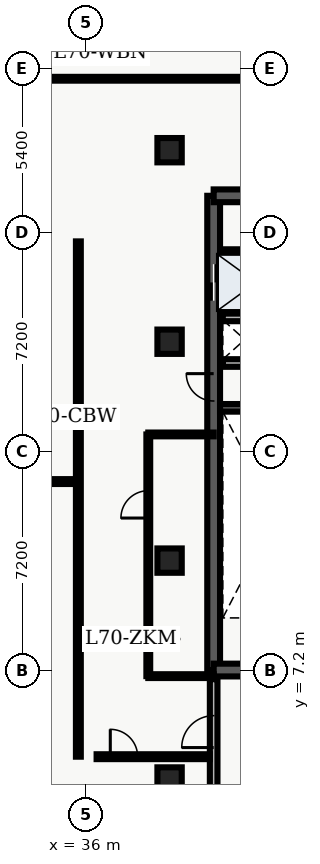
"""IFC4 building model, lengths in metres.
Left out: names, types, materials, properties, quantities, classifications, styles, units other than length and angle.
Written with IfcOpenShell. Run it as: python <this file> out.ifc"""

import sys

from ifc_helpers import new_model, entity, si_unit, converted_unit, direction, frame, origin_with_axes, origin_2d_with_axis, place, context, subcontext, project, spatial, polyline, rectangle, outline, extrude, element, fill, save


model = new_model("IFC4")
c1 = context("Model", 3, precision=1e-05, world=origin_with_axes(), true_north=direction((0.0, 1.0)))
c2 = subcontext(c1, "Body", "Model", "MODEL_VIEW")
j1 = project(units=[si_unit("LENGTHUNIT", "METRE"), converted_unit("PLANEANGLEUNIT", "DEGREE", entity("IfcPlaneAngleMeasure", 0.017), si_unit("PLANEANGLEUNIT", "RADIAN"), dimensions=[0, 0, 0, 0, 0, 0, 0])], contexts=[c1])
p1 = place(None, origin_with_axes())
s1 = spatial("IfcSite", under=j1, at=p1, CompositionType="ELEMENT")
p2 = place(p1, origin_with_axes())
s2 = spatial("IfcBuilding", under=s1, at=p2, CompositionType="ELEMENT")
p3 = place(p2, frame((0.0, 0.0, 284.1), z_axis=(0.0, 0.0, 1.0), x_axis=(1.0, 0.0, 0.0)))
s3 = spatial("IfcBuildingStorey", under=s2, at=p3, CompositionType="ELEMENT", Elevation=284.1)
p4 = place(p3, frame((40.2, 7.2, 0.0), z_axis=(0.0, 0.0, 1.0), x_axis=(0.0, 1.0, 0.0)))
e1 = element("IfcWall", 1, at=p4, inside=s3, PredefinedType="SHEAR", context=c2, shape_type="SweptSolid", body=[
    extrude(outline(polyline([(0.0, -0.21), (15.6, -0.21), (15.6, 0.21), (0.0, 0.21), (0.0, -0.21)])), origin_with_axes(), (0.0, 0.0, 1.0), 3.6),
])
p5 = place(p4, frame((12.75, 0.0, 0.0), z_axis=(0.0, 0.0, 1.0), x_axis=(1.0, 0.0, 0.0)))
e2 = element("IfcOpeningElement", 2, at=p5, cuts=e1, PredefinedType="OPENING", context=c2, shape_type="SweptSolid", body=[
    extrude(rectangle(XDim=1.2, YDim=0.44, at=origin_2d_with_axis()), origin_with_axes(), (0.0, 0.0, 1.0), 2.15),
])
p6 = place(p4, frame((9.3, 0.0, 0.0), z_axis=(0.0, 0.0, 1.0), x_axis=(1.0, 0.0, 0.0)))
e3 = element("IfcOpeningElement", 3, at=p6, cuts=e1, PredefinedType="OPENING", context=c2, shape_type="SweptSolid", body=[
    extrude(rectangle(XDim=0.9, YDim=0.44, at=origin_2d_with_axis()), origin_with_axes(), (0.0, 0.0, 1.0), 2.15),
])
p7 = place(p3, frame((40.2, 7.2, 0.0), z_axis=(0.0, 0.0, 1.0), x_axis=(1.0, 0.0, 0.0)))
e4 = element("IfcWall", 4, at=p7, inside=s3, PredefinedType="SHEAR", context=c2, shape_type="SweptSolid", body=[
    extrude(outline(polyline([(0.0, -0.21), (7.85, -0.21), (7.85, 0.21), (0.0, 0.21), (0.0, -0.21)])), origin_with_axes(), (0.0, 0.0, 1.0), 3.6),
])
p8 = place(p7, frame((2.175, 0.0, 0.0), z_axis=(0.0, 0.0, 1.0), x_axis=(1.0, 0.0, 0.0)))
e5 = element("IfcOpeningElement", 5, at=p8, cuts=e4, PredefinedType="OPENING", context=c2, shape_type="SweptSolid", body=[
    extrude(rectangle(XDim=1.05, YDim=0.44, at=origin_2d_with_axis()), origin_with_axes(), (0.0, 0.0, 1.0), 2.15),
])
p9 = place(p3, frame((40.2, 22.8, 0.0), z_axis=(0.0, 0.0, 1.0), x_axis=(1.0, 0.0, 0.0)))
e6 = element("IfcWall", 6, at=p9, inside=s3, PredefinedType="SHEAR", context=c2, shape_type="SweptSolid", body=[
    extrude(outline(polyline([(0.0, -0.21), (7.85, -0.21), (7.85, 0.21), (0.0, 0.21), (0.0, -0.21)])), origin_with_axes(), (0.0, 0.0, 1.0), 3.6),
])
p10 = place(p9, frame((5.775, 0.0, 0.0), z_axis=(0.0, 0.0, 1.0), x_axis=(1.0, 0.0, 0.0)))
e7 = element("IfcOpeningElement", 7, at=p10, cuts=e6, PredefinedType="OPENING", context=c2, shape_type="SweptSolid", body=[
    extrude(rectangle(XDim=1.05, YDim=0.44, at=origin_2d_with_axis()), origin_with_axes(), (0.0, 0.0, 1.0), 2.15),
])
p11 = place(p9, frame((2.15, 0.0, 0.0), z_axis=(0.0, 0.0, 1.0), x_axis=(1.0, 0.0, 0.0)))
e8 = element("IfcOpeningElement", 8, at=p11, cuts=e6, PredefinedType="OPENING", context=c2, shape_type="SweptSolid", body=[
    extrude(rectangle(XDim=0.9, YDim=0.44, at=origin_2d_with_axis()), origin_with_axes(), (0.0, 0.0, 1.0), 2.15),
])
p12 = place(p3, frame((40.41, 15.825, 0.0), z_axis=(0.0, 0.0, 1.0), x_axis=(1.0, 0.0, 0.0)))
e9 = element("IfcWall", 9, at=p12, inside=s3, PredefinedType="SHEAR", context=c2, shape_type="SweptSolid", body=[
    extrude(outline(polyline([(0.0, -0.125), (3.59, -0.125), (3.59, 0.125), (0.0, 0.125), (0.0, -0.125)])), origin_with_axes(), (0.0, 0.0, 1.0), 3.6),
])
p13 = place(p3, frame((40.5, 17.3, 0.0), z_axis=(0.0, 0.0, 1.0), x_axis=(1.0, 0.0, 0.0)))
e10 = element("IfcWall", 10, at=p13, inside=s3, PredefinedType="SOLIDWALL", context=c2, shape_type="SweptSolid", body=[
    extrude(outline(polyline([(0.0, -0.125), (3.5, -0.125), (3.5, 0.125), (0.0, 0.125), (0.0, -0.125)])), origin_with_axes(), (0.0, 0.0, 1.0), 2.64),
])
p14 = place(p13, frame((2.4, 0.0, 0.0), z_axis=(0.0, 0.0, 1.0), x_axis=(1.0, 0.0, 0.0)))
e11 = element("IfcOpeningElement", 11, at=p14, cuts=e10, PredefinedType="OPENING", context=c2, shape_type="SweptSolid", body=[
    extrude(rectangle(XDim=0.9, YDim=0.27, at=origin_2d_with_axis()), origin_with_axes(), (0.0, 0.0, 1.0), 2.15),
])
p15 = place(p3, frame((40.5, 18.8, 0.0), z_axis=(0.0, 0.0, 1.0), x_axis=(1.0, 0.0, 0.0)))
e12 = element("IfcWall", 12, at=p15, inside=s3, PredefinedType="SOLIDWALL", context=c2, shape_type="SweptSolid", body=[
    extrude(outline(polyline([(0.0, -0.125), (3.5, -0.125), (3.5, 0.125), (0.0, 0.125), (0.0, -0.125)])), origin_with_axes(), (0.0, 0.0, 1.0), 2.64),
])
p16 = place(p3, frame((40.2, 3.1, 0.0), z_axis=(0.0, 0.0, 1.0), x_axis=(0.0, 1.0, 0.0)))
e13 = element("IfcWall", 13, at=p16, inside=s3, PredefinedType="SOLIDWALL", context=c2, shape_type="SweptSolid", body=[
    extrude(outline(polyline([(0.0, -0.125), (3.8, -0.125), (3.8, 0.125), (0.0, 0.125), (0.0, -0.125)])), origin_with_axes(), (0.0, 0.0, 1.0), 2.64),
])
p17 = place(p16, frame((2.075, 0.0, 0.0), z_axis=(0.0, 0.0, 1.0), x_axis=(1.0, 0.0, 0.0)))
e14 = element("IfcOpeningElement", 14, at=p17, cuts=e13, PredefinedType="OPENING", context=c2, shape_type="SweptSolid", body=[
    extrude(rectangle(XDim=1.05, YDim=0.27, at=origin_2d_with_axis()), origin_with_axes(), (0.0, 0.0, 1.0), 2.15),
])
for number, where, z_axis, x_axis in (
    (15, (38.75, 3.6, 0.0), (0.0, 0.0, 1.0), (1.0, 0.0, 0.0)),
    (16, (38.75, 10.8, 0.0), (0.0, 0.0, 1.0), (1.0, 0.0, 0.0)),
    (17, (38.75, 18.0, 0.0), (0.0, 0.0, 1.0), (1.0, 0.0, 0.0)),
    (18, (38.75, 24.3, 0.0), (0.0, 0.0, 1.0), (1.0, 0.0, 0.0)),
):
    element("IfcColumn", number, at=place(p3, frame(where, z_axis=z_axis, x_axis=x_axis)), inside=s3, PredefinedType="COLUMN", context=c2, shape_type="SweptSolid", body=[
        extrude(rectangle(XDim=0.8, YDim=0.8, at=origin_2d_with_axis()), origin_with_axes(), (0.0, 0.0, 1.0), 3.9),
    ])
p18 = place(p3, frame((40.5, 20.96, 0.0), z_axis=(0.0, 0.0, 1.0), x_axis=(1.0, 0.0, 0.0)))
e19 = element("IfcWall", 19, at=p18, inside=s3, PredefinedType="PARTITIONING", context=c2, shape_type="SweptSolid", body=[
    extrude(outline(polyline([(0.0, -0.08), (3.5, -0.08), (3.5, 0.08), (0.0, 0.08), (0.0, -0.08)])), origin_with_axes(), (0.0, 0.0, 1.0), 2.64),
])
p19 = place(p3, frame((20.3, 13.4, 0.0), z_axis=(0.0, 0.0, 1.0), x_axis=(1.0, 0.0, 0.0)))
e20 = element("IfcWall", 20, at=p19, inside=s3, PredefinedType="PARTITIONING", context=c2, shape_type="SweptSolid", body=[
    extrude(outline(polyline([(0.0, -0.08), (15.45, -0.08), (15.45, 0.08), (0.0, 0.08), (0.0, -0.08)])), origin_with_axes(), (0.0, 0.0, 1.0), 2.64),
])
p20 = place(p19, frame((2.304, 0.0, 0.0), z_axis=(0.0, 0.0, 1.0), x_axis=(1.0, 0.0, 0.0)))
e21 = element("IfcOpeningElement", 21, at=p20, cuts=e20, PredefinedType="OPENING", context=c2, shape_type="SweptSolid", body=[
    extrude(rectangle(XDim=1.0, YDim=0.18, at=origin_2d_with_axis()), origin_with_axes(), (0.0, 0.0, 1.0), 2.15),
])
p21 = place(p19, frame((6.866, 0.0, 0.0), z_axis=(0.0, 0.0, 1.0), x_axis=(1.0, 0.0, 0.0)))
e22 = element("IfcOpeningElement", 22, at=p21, cuts=e20, PredefinedType="OPENING", context=c2, shape_type="SweptSolid", body=[
    extrude(rectangle(XDim=1.0, YDim=0.18, at=origin_2d_with_axis()), origin_with_axes(), (0.0, 0.0, 1.0), 2.15),
])
p22 = place(p19, frame((12.337, 0.0, 0.0), z_axis=(0.0, 0.0, 1.0), x_axis=(1.0, 0.0, 0.0)))
e23 = element("IfcOpeningElement", 23, at=p22, cuts=e20, PredefinedType="OPENING", context=c2, shape_type="SweptSolid", body=[
    extrude(rectangle(XDim=1.2, YDim=0.18, at=origin_2d_with_axis()), origin_with_axes(), (0.0, 0.0, 1.0), 2.2),
])
p23 = place(p3, frame((20.3, 15.7, 0.0), z_axis=(0.0, 0.0, 1.0), x_axis=(1.0, 0.0, 0.0)))
e24 = element("IfcWall", 24, at=p23, inside=s3, PredefinedType="PARTITIONING", context=c2, shape_type="SweptSolid", body=[
    extrude(outline(polyline([(0.0, -0.08), (15.45, -0.08), (15.45, 0.08), (0.0, 0.08), (0.0, -0.08)])), origin_with_axes(), (0.0, 0.0, 1.0), 2.64),
])
p24 = place(p23, frame((7.775, 0.0, 0.0), z_axis=(0.0, 0.0, 1.0), x_axis=(1.0, 0.0, 0.0)))
e25 = element("IfcOpeningElement", 25, at=p24, cuts=e24, PredefinedType="OPENING", context=c2, shape_type="SweptSolid", body=[
    extrude(rectangle(XDim=1.0, YDim=0.18, at=origin_2d_with_axis()), origin_with_axes(), (0.0, 0.0, 1.0), 2.15),
])
p25 = place(p3, frame((35.75, 4.35, 0.0), z_axis=(0.0, 0.0, 1.0), x_axis=(0.0, 1.0, 0.0)))
e26 = element("IfcWall", 26, at=p25, inside=s3, PredefinedType="PARTITIONING", context=c2, shape_type="SweptSolid", body=[
    extrude(outline(polyline([(0.0, -0.08), (16.95, -0.08), (16.95, 0.08), (0.0, 0.08), (0.0, -0.08)])), origin_with_axes(), (0.0, 0.0, 1.0), 2.64),
])
p26 = place(p3, frame((34.535, 26.65, 0.0), z_axis=(0.0, 0.0, 1.0), x_axis=(1.0, 0.0, 0.0)))
e27 = element("IfcWall", 27, at=p26, inside=s3, PredefinedType="PARTITIONING", context=c2, shape_type="SweptSolid", body=[
    extrude(outline(polyline([(0.0, -0.062), (12.995, -0.062), (12.995, 0.062), (0.0, 0.062), (0.0, -0.062)])), origin_with_axes(), (0.0, 0.0, 1.0), 2.64),
])
p27 = place(p26, frame((8.465, 0.0, 0.0), z_axis=(0.0, 0.0, 1.0), x_axis=(1.0, 0.0, 0.0)))
e28 = element("IfcOpeningElement", 28, at=p27, cuts=e27, PredefinedType="OPENING", context=c2, shape_type="SweptSolid", body=[
    extrude(rectangle(XDim=1.0, YDim=0.145, at=origin_2d_with_axis()), origin_with_axes(), (0.0, 0.0, 1.0), 2.15),
])
p28 = place(p3, frame((36.35, 4.35, 0.0), z_axis=(0.0, 0.0, 1.0), x_axis=(1.0, 0.0, 0.0)))
e29 = element("IfcWall", 29, at=p28, inside=s3, PredefinedType="PARTITIONING", context=c2, shape_type="SweptSolid", body=[
    extrude(outline(polyline([(0.0, -0.08), (3.725, -0.08), (3.725, 0.08), (0.0, 0.08), (0.0, -0.08)])), origin_with_axes(), (0.0, 0.0, 1.0), 2.64),
])
p29 = place(p28, frame((0.9, 0.0, 0.0), z_axis=(0.0, 0.0, 1.0), x_axis=(1.0, 0.0, 0.0)))
e30 = element("IfcOpeningElement", 30, at=p29, cuts=e29, PredefinedType="OPENING", context=c2, shape_type="SweptSolid", body=[
    extrude(rectangle(XDim=0.9, YDim=0.18, at=origin_2d_with_axis()), origin_with_axes(), (0.0, 0.0, 1.0), 2.15),
])
for number, where, z_axis, x_axis in (
    (31, (38.05, 7.0, 0.0), (0.0, 0.0, 1.0), (1.0, 0.0, 0.0)),
    (32, (38.05, 14.95, 0.0), (0.0, 0.0, 1.0), (1.0, 0.0, 0.0)),
):
    element("IfcWall", number, at=place(p3, frame(where, z_axis=z_axis, x_axis=x_axis)), inside=s3, PredefinedType="PARTITIONING", context=c2, shape_type="SweptSolid", body=[
        extrude(outline(polyline([(0.0, -0.062), (2.15, -0.062), (2.15, 0.062), (0.0, 0.062), (0.0, -0.062)])), origin_with_axes(), (0.0, 0.0, 1.0), 2.64),
    ])
p30 = place(p3, frame((38.05, 7.0, 0.0), z_axis=(0.0, 0.0, 1.0), x_axis=(0.0, 1.0, 0.0)))
e33 = element("IfcWall", 33, at=p30, inside=s3, PredefinedType="PARTITIONING", context=c2, shape_type="SweptSolid", body=[
    extrude(outline(polyline([(0.0, -0.062), (7.95, -0.062), (7.95, 0.062), (0.0, 0.062), (0.0, -0.062)])), origin_with_axes(), (0.0, 0.0, 1.0), 2.64),
])
p31 = place(p30, frame((5.65, 0.0, 0.0), z_axis=(0.0, 0.0, 1.0), x_axis=(1.0, 0.0, 0.0)))
e34 = element("IfcOpeningElement", 34, at=p31, cuts=e33, PredefinedType="OPENING", context=c2, shape_type="SweptSolid", body=[
    extrude(rectangle(XDim=0.9, YDim=0.145, at=origin_2d_with_axis()), origin_with_axes(), (0.0, 0.0, 1.0), 2.15),
])
p32 = place(p4, frame((12.75, 0.0, 0.0), z_axis=(0.0, 0.0, 1.0), x_axis=(1.0, 0.0, 0.0)))
e35 = element("IfcDoor", 35, at=p32, inside=s3, OperationType="DOUBLE_DOOR_SLIDING", PredefinedType="DOOR", context=c2, shape_type="SweptSolid", body=[
    extrude(rectangle(XDim=1.2, YDim=0.09, at=origin_2d_with_axis()), origin_with_axes(), (0.0, 0.0, 1.0), 2.15),
])
fill(e2, e35)
p33 = place(p4, frame((9.3, 0.0, 0.0), z_axis=(0.0, 0.0, 1.0), x_axis=(1.0, 0.0, 0.0)))
e36 = element("IfcDoor", 36, at=p33, inside=s3, OperationType="SINGLE_SWING_RIGHT", PredefinedType="DOOR", context=c2, shape_type="SweptSolid", body=[
    extrude(rectangle(XDim=0.9, YDim=0.09, at=origin_2d_with_axis()), origin_with_axes(), (0.0, 0.0, 1.0), 2.15),
])
fill(e3, e36)
p34 = place(p16, frame((2.075, 0.0, 0.0), z_axis=(0.0, 0.0, 1.0), x_axis=(1.0, 0.0, 0.0)))
e37 = element("IfcDoor", 37, at=p34, inside=s3, OperationType="SINGLE_SWING_LEFT", PredefinedType="DOOR", context=c2, shape_type="SweptSolid", body=[
    extrude(rectangle(XDim=1.05, YDim=0.09, at=origin_2d_with_axis()), origin_with_axes(), (0.0, 0.0, 1.0), 2.15),
])
fill(e14, e37)
p35 = place(p28, frame((0.9, 0.0, 0.0), z_axis=(0.0, 0.0, 1.0), x_axis=(1.0, 0.0, 0.0)))
e38 = element("IfcDoor", 38, at=p35, inside=s3, OperationType="SINGLE_SWING_LEFT", PredefinedType="DOOR", context=c2, shape_type="SweptSolid", body=[
    extrude(rectangle(XDim=0.9, YDim=0.09, at=origin_2d_with_axis()), origin_with_axes(), (0.0, 0.0, 1.0), 2.15),
])
fill(e30, e38)
p36 = place(p30, frame((5.65, 0.0, 0.0), z_axis=(0.0, 0.0, 1.0), x_axis=(1.0, 0.0, 0.0)))
e39 = element("IfcDoor", 39, at=p36, inside=s3, OperationType="SINGLE_SWING_LEFT", PredefinedType="DOOR", context=c2, shape_type="SweptSolid", body=[
    extrude(rectangle(XDim=0.9, YDim=0.075, at=origin_2d_with_axis()), origin_with_axes(), (0.0, 0.0, 1.0), 2.15),
])
fill(e34, e39)
save(model, sys.argv[1])
